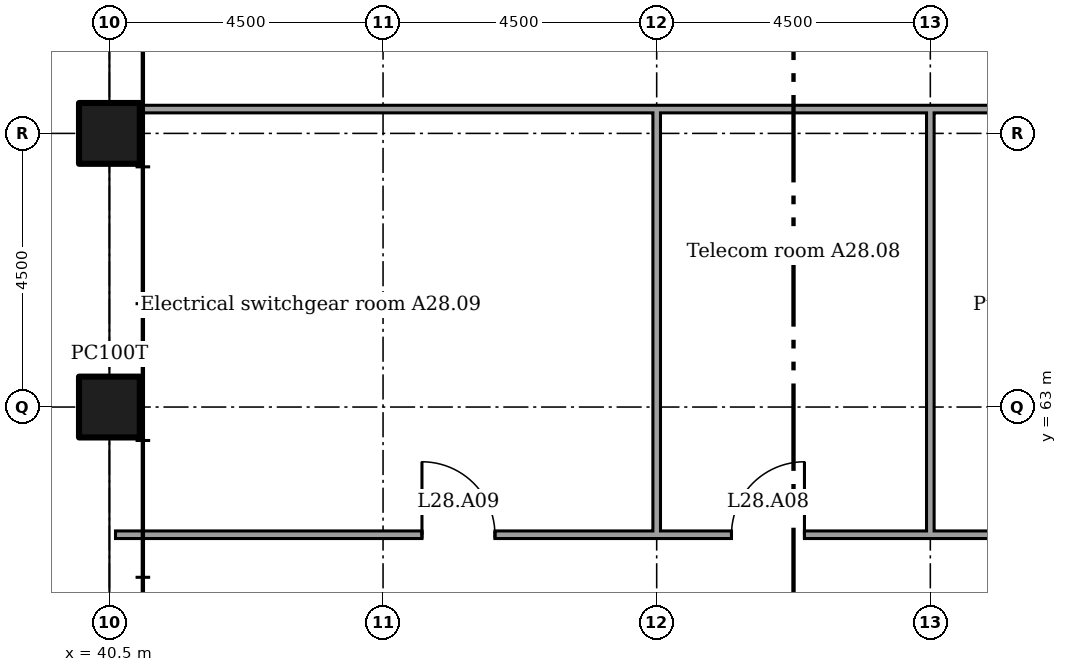
"""IFC4 building model, lengths in metres.
Left out: names, types, materials, properties, quantities, classifications, styles, units other than length and angle.
Written with IfcOpenShell. Run it as: python <this file> out.ifc"""

import sys

from ifc_helpers import new_model, si_unit, direction, frame, frame_2d, origin, origin_2d, place, context, subcontext, project, spatial, rectangle, extrude, element, fill, save


model = new_model("IFC4")
c1 = context("Model", 3, precision=1e-05, world=origin(), true_north=direction((0.0, 1.0)))
c2 = subcontext(c1, "Body", "Model", "MODEL_VIEW")
j1 = project(units=[si_unit("LENGTHUNIT", "METRE"), si_unit("PLANEANGLEUNIT", "RADIAN")], contexts=[c1])
p1 = place(None, origin())
s1 = spatial("IfcSite", under=j1, at=p1, CompositionType="ELEMENT")
p2 = place(p1, origin())
s2 = spatial("IfcBuilding", under=s1, at=p2, CompositionType="ELEMENT")
p3 = place(p2, frame((0.0, 0.0, 113.6)))
s3 = spatial("IfcBuildingStorey", under=s2, at=p3, CompositionType="ELEMENT", Elevation=113.6)
for number, where in (
    (1, (40.5, 67.5, 0.0)),
    (2, (40.5, 63.0, 0.0)),
):
    element("IfcColumn", number, at=place(p3, frame(where)), inside=s3, PredefinedType="COLUMN", context=c2, shape_type="SweptSolid", body=[
        extrude(rectangle(XDim=1.0, YDim=1.0, at=origin_2d()), origin(), (0.0, 0.0, 1.0), 7.2),
    ])
p4 = place(p3, frame((40.6, 60.9, 0.0)))
e3 = element("IfcWall", 3, at=p4, inside=s3, PredefinedType="PARTITIONING", context=c2, shape_type="SweptSolid", body=[
    extrude(rectangle(XDim=20.362, YDim=0.125, at=frame_2d((10.181, 0.0))), origin(), (0.0, 0.0, 1.0), 7.05),
])
p5 = place(p4, frame((15.05, 0.0, 0.0)))
e4 = element("IfcOpeningElement", 4, at=p5, cuts=e3, PredefinedType="OPENING", context=c2, shape_type="SweptSolid", body=[
    extrude(rectangle(XDim=1.2, YDim=2.1, at=frame_2d((0.6, 1.05))), frame((0.0, 0.073, 0.0), z_axis=(0.0, -1.0, 0.0), x_axis=(1.0, 0.0, 0.0)), (0.0, 0.0, 1.0), 0.145),
])
p6 = place(p4, frame((10.13, 0.0, 0.0)))
e5 = element("IfcOpeningElement", 5, at=p6, cuts=e3, PredefinedType="OPENING", context=c2, shape_type="SweptSolid", body=[
    extrude(rectangle(XDim=1.2, YDim=2.1, at=frame_2d((0.6, 1.05))), frame((0.0, 0.073, 0.0), z_axis=(0.0, -1.0, 0.0), x_axis=(1.0, 0.0, 0.0)), (0.0, 0.0, 1.0), 0.145),
])
p7 = place(p4, frame((5.04, 0.0, 0.0)))
e6 = element("IfcOpeningElement", 6, at=p7, cuts=e3, PredefinedType="OPENING", context=c2, shape_type="SweptSolid", body=[
    extrude(rectangle(XDim=1.2, YDim=2.1, at=frame_2d((0.6, 1.05))), frame((0.0, 0.073, 0.0), z_axis=(0.0, -1.0, 0.0), x_axis=(1.0, 0.0, 0.0)), (0.0, 0.0, 1.0), 0.145),
])
p8 = place(p3, frame((41.0, 67.9, 0.0)))
e7 = element("IfcWall", 7, at=p8, inside=s3, PredefinedType="PARTITIONING", context=c2, shape_type="SweptSolid", body=[
    extrude(rectangle(XDim=26.962, YDim=0.125, at=frame_2d((13.481, 0.0))), origin(), (0.0, 0.0, 1.0), 7.05),
])
for number, where, z_axis, x_axis in (
    (8, (49.5, 60.9, 0.0), (0.0, 0.0, 1.0), (0.0, 1.0, 0.0)),
    (9, (54.0, 60.9, 0.0), (0.0, 0.0, 1.0), (0.0, 1.0, 0.0)),
):
    element("IfcWall", number, at=place(p3, frame(where, z_axis=z_axis, x_axis=x_axis)), inside=s3, PredefinedType="PARTITIONING", context=c2, shape_type="SweptSolid", body=[
        extrude(rectangle(XDim=7.0, YDim=0.125, at=frame_2d((3.5, 0.0))), origin(), (0.0, 0.0, 1.0), 6.366),
    ])
p9 = place(p6, origin())
e10 = element("IfcDoor", 10, at=p9, inside=s3, OperationType="SINGLE_SWING_LEFT", PredefinedType="DOOR", context=c2, shape_type="SweptSolid", body=[
    extrude(rectangle(XDim=1.2, YDim=2.1, at=frame_2d((0.6, 1.05))), frame((0.0, 0.025, 0.0), z_axis=(0.0, -1.0, 0.0), x_axis=(1.0, 0.0, 0.0)), (0.0, 0.0, 1.0), 0.05),
])
fill(e5, e10)
p10 = place(p7, origin())
e11 = element("IfcDoor", 11, at=p10, inside=s3, OperationType="SINGLE_SWING_RIGHT", PredefinedType="DOOR", context=c2, shape_type="SweptSolid", body=[
    extrude(rectangle(XDim=1.2, YDim=2.1, at=frame_2d((0.6, 1.05))), frame((0.0, 0.025, 0.0), z_axis=(0.0, -1.0, 0.0), x_axis=(1.0, 0.0, 0.0)), (0.0, 0.0, 1.0), 0.05),
])
fill(e6, e11)
save(model, sys.argv[1])
